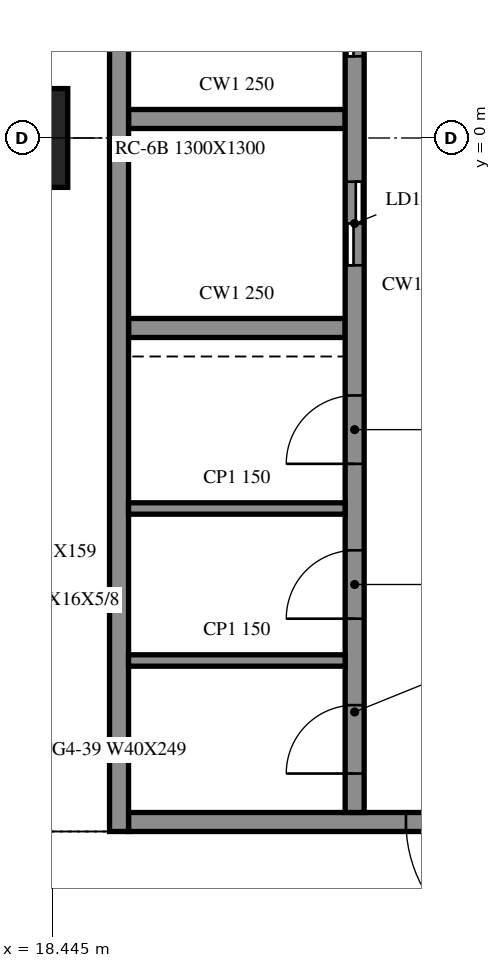
"""IFC4 building model, lengths in metres.
Left out: names, types, materials, properties, quantities, classifications, styles, units other than length and angle.
Written with IfcOpenShell. Run it as: python <this file> out.ifc"""

import sys

from ifc_helpers import new_model, si_unit, direction, frame, frame_2d, origin, origin_2d, place, context, subcontext, project, spatial, rectangle, extrude, element, fill, save


model = new_model("IFC4")
c1 = context("Model", 3, precision=1e-05, world=origin(), true_north=direction((0.0, 1.0)))
c2 = subcontext(c1, "Body", "Model", "MODEL_VIEW")
j1 = project(units=[si_unit("LENGTHUNIT", "METRE"), si_unit("PLANEANGLEUNIT", "RADIAN")], contexts=[c1])
p1 = place(None, origin())
s1 = spatial("IfcSite", under=j1, at=p1, CompositionType="ELEMENT")
p2 = place(p1, origin())
s2 = spatial("IfcBuilding", under=s1, at=p2, CompositionType="ELEMENT")
p3 = place(p2, frame((0.0, 0.0, 154.8)))
s3 = spatial("IfcBuildingStorey", under=s2, at=p3, CompositionType="ELEMENT", Elevation=154.8)
p4 = place(p3, frame((18.0, 0.0, -0.55), z_axis=(0.0, 0.0, 1.0), x_axis=(1.0, 0.0, 0.0)))
e1 = element("IfcColumn", 1, at=p4, inside=s3, PredefinedType="COLUMN", context=c2, shape_type="SweptSolid", body=[
    extrude(rectangle(XDim=1.3, YDim=1.3, at=origin_2d()), origin(), (0.0, 0.0, 1.0), 4.61),
])
p5 = place(p3, frame((19.325, 15.125, 0.0), z_axis=(0.0, 0.0, 1.0), x_axis=(0.0, -1.0, 0.0)))
e2 = element("IfcWall", 2, at=p5, inside=s3, PredefinedType="SOLIDWALL", context=c2, shape_type="SweptSolid", body=[
    extrude(rectangle(XDim=24.25, YDim=0.25, at=frame_2d((12.125, 0.0))), origin(), (0.0, 0.0, 1.0), 4.06),
])
p6 = place(p3, frame((28.55, -9.0, 0.0), z_axis=(0.0, 0.0, 1.0), x_axis=(-1.0, 0.0, 0.0)))
e3 = element("IfcWall", 3, at=p6, inside=s3, PredefinedType="SOLIDWALL", context=c2, shape_type="SweptSolid", body=[
    extrude(rectangle(XDim=9.1, YDim=0.25, at=frame_2d((4.55, 0.0))), origin(), (0.0, 0.0, 1.0), 4.06),
])
p7 = place(p6, frame((3.65, 0.0, 0.0)))
e4 = element("IfcOpeningElement", 4, at=p7, cuts=e3, PredefinedType="OPENING", context=c2, shape_type="SweptSolid", body=[
    extrude(rectangle(XDim=1.8, YDim=2.1, at=frame_2d((0.9, 1.05))), frame((0.0, 0.135, 0.0), z_axis=(0.0, -1.0, 0.0), x_axis=(1.0, 0.0, 0.0)), (0.0, 0.0, 1.0), 0.27),
])
p8 = place(p3, frame((22.425, -8.875, 0.0), z_axis=(0.0, 0.0, 1.0), x_axis=(0.0, 1.0, 0.0)))
e5 = element("IfcWall", 5, at=p8, inside=s3, PredefinedType="SOLIDWALL", context=c2, shape_type="SweptSolid", body=[
    extrude(rectangle(XDim=17.5, YDim=0.25, at=frame_2d((8.75, 0.0))), origin(), (0.0, 0.0, 1.0), 4.06),
])
p9 = place(p8, frame((7.2, 0.0, 0.0)))
e6 = element("IfcOpeningElement", 6, at=p9, cuts=e5, PredefinedType="OPENING", context=c2, shape_type="SweptSolid", body=[
    extrude(rectangle(XDim=1.1, YDim=2.1, at=frame_2d((0.55, 1.05))), frame((0.0, 0.135, 0.0), z_axis=(0.0, -1.0, 0.0), x_axis=(1.0, 0.0, 0.0)), (0.0, 0.0, 1.0), 0.27),
])
p10 = place(p8, frame((9.95, 0.0, 0.0)))
e7 = element("IfcOpeningElement", 7, at=p10, cuts=e5, PredefinedType="OPENING", context=c2, shape_type="SweptSolid", body=[
    extrude(rectangle(XDim=1.1, YDim=2.1, at=frame_2d((0.55, 1.05))), frame((0.0, 0.135, 0.0), z_axis=(0.0, -1.0, 0.0), x_axis=(1.0, 0.0, 0.0)), (0.0, 0.0, 1.0), 0.27),
])
p11 = place(p8, frame((12.7, 0.0, 0.0)))
e8 = element("IfcOpeningElement", 8, at=p11, cuts=e5, PredefinedType="OPENING", context=c2, shape_type="SweptSolid", body=[
    extrude(rectangle(XDim=1.1, YDim=2.1, at=frame_2d((0.55, 1.05))), frame((0.0, 0.135, 0.0), z_axis=(0.0, -1.0, 0.0), x_axis=(1.0, 0.0, 0.0)), (0.0, 0.0, 1.0), 0.27),
])
p12 = place(p8, frame((15.45, 0.0, 0.0)))
e9 = element("IfcOpeningElement", 9, at=p12, cuts=e5, PredefinedType="OPENING", context=c2, shape_type="SweptSolid", body=[
    extrude(rectangle(XDim=1.1, YDim=2.1, at=frame_2d((0.55, 1.05))), frame((0.0, 0.135, 0.0), z_axis=(0.0, -1.0, 0.0), x_axis=(1.0, 0.0, 0.0)), (0.0, 0.0, 1.0), 0.27),
])
p13 = place(p8, frame((0.512, 0.0, 0.0)))
e10 = element("IfcOpeningElement", 10, at=p13, cuts=e5, PredefinedType="OPENING", context=c2, shape_type="SweptSolid", body=[
    extrude(rectangle(XDim=0.9, YDim=2.1, at=frame_2d((0.45, 1.05))), frame((0.0, 0.135, 0.0), z_axis=(0.0, -1.0, 0.0), x_axis=(1.0, 0.0, 0.0)), (0.0, 0.0, 1.0), 0.27),
])
p14 = place(p8, frame((2.55, 0.0, 0.0)))
e11 = element("IfcOpeningElement", 11, at=p14, cuts=e5, PredefinedType="OPENING", context=c2, shape_type="SweptSolid", body=[
    extrude(rectangle(XDim=0.9, YDim=2.1, at=frame_2d((0.45, 1.05))), frame((0.0, 0.135, 0.0), z_axis=(0.0, -1.0, 0.0), x_axis=(1.0, 0.0, 0.0)), (0.0, 0.0, 1.0), 0.27),
])
p15 = place(p8, frame((4.587, 0.0, 0.0)))
e12 = element("IfcOpeningElement", 12, at=p15, cuts=e5, PredefinedType="OPENING", context=c2, shape_type="SweptSolid", body=[
    extrude(rectangle(XDim=0.9, YDim=2.1, at=frame_2d((0.45, 1.05))), frame((0.0, 0.135, 0.0), z_axis=(0.0, -1.0, 0.0), x_axis=(1.0, 0.0, 0.0)), (0.0, 0.0, 1.0), 0.27),
])
for number, where, z_axis, x_axis in (
    (13, (19.45, -2.5, 0.0), (0.0, 0.0, 1.0), (1.0, 0.0, 0.0)),
    (14, (19.45, 0.25, 0.0), (0.0, 0.0, 1.0), (1.0, 0.0, 0.0)),
):
    element("IfcWall", number, at=place(p3, frame(where, z_axis=z_axis, x_axis=x_axis)), inside=s3, PredefinedType="SOLIDWALL", context=c2, shape_type="SweptSolid", body=[
        extrude(rectangle(XDim=2.85, YDim=0.25, at=frame_2d((1.425, 0.0))), origin(), (0.0, 0.0, 1.0), 4.06),
    ])
for number, where, z_axis, x_axis in (
    (15, (19.45, -6.875, 0.0), (0.0, 0.0, 1.0), (1.0, 0.0, 0.0)),
    (16, (19.45, -4.875, 0.0), (0.0, 0.0, 1.0), (1.0, 0.0, 0.0)),
):
    element("IfcWall", number, at=place(p3, frame(where, z_axis=z_axis, x_axis=x_axis)), inside=s3, PredefinedType="PARTITIONING", context=c2, shape_type="SweptSolid", body=[
        extrude(rectangle(XDim=2.85, YDim=0.15, at=frame_2d((1.425, 0.0))), origin(), (0.0, 0.0, 1.0), 4.06),
    ])
p16 = place(p7, origin())
e17 = element("IfcDoor", 17, at=p16, inside=s3, OperationType="DOUBLE_DOOR_SINGLE_SWING", PredefinedType="DOOR", context=c2, shape_type="SweptSolid", body=[
    extrude(rectangle(XDim=1.8, YDim=2.1, at=frame_2d((0.9, 1.05))), frame((0.0, 0.025, 0.0), z_axis=(0.0, -1.0, 0.0), x_axis=(1.0, 0.0, 0.0)), (0.0, 0.0, 1.0), 0.05),
])
fill(e4, e17)
p17 = place(p9, origin())
e18 = element("IfcDoor", 18, at=p17, inside=s3, OperationType="DOUBLE_DOOR_SLIDING", PredefinedType="DOOR", context=c2, shape_type="SweptSolid", body=[
    extrude(rectangle(XDim=1.1, YDim=2.1, at=frame_2d((0.55, 1.05))), frame((0.0, 0.025, 0.0), z_axis=(0.0, -1.0, 0.0), x_axis=(1.0, 0.0, 0.0)), (0.0, 0.0, 1.0), 0.05),
])
fill(e6, e18)
p18 = place(p10, origin())
e19 = element("IfcDoor", 19, at=p18, inside=s3, OperationType="DOUBLE_DOOR_SLIDING", PredefinedType="DOOR", context=c2, shape_type="SweptSolid", body=[
    extrude(rectangle(XDim=1.1, YDim=2.1, at=frame_2d((0.55, 1.05))), frame((0.0, 0.025, 0.0), z_axis=(0.0, -1.0, 0.0), x_axis=(1.0, 0.0, 0.0)), (0.0, 0.0, 1.0), 0.05),
])
fill(e7, e19)
p19 = place(p13, origin())
e20 = element("IfcDoor", 20, at=p19, inside=s3, OperationType="SINGLE_SWING_RIGHT", PredefinedType="DOOR", context=c2, shape_type="SweptSolid", body=[
    extrude(rectangle(XDim=0.9, YDim=2.1, at=frame_2d((0.45, 1.05))), frame((0.0, 0.025, 0.0), z_axis=(0.0, -1.0, 0.0), x_axis=(1.0, 0.0, 0.0)), (0.0, 0.0, 1.0), 0.05),
])
fill(e10, e20)
p20 = place(p14, origin())
e21 = element("IfcDoor", 21, at=p20, inside=s3, OperationType="SINGLE_SWING_LEFT", PredefinedType="DOOR", context=c2, shape_type="SweptSolid", body=[
    extrude(rectangle(XDim=0.9, YDim=2.1, at=frame_2d((0.45, 1.05))), frame((0.0, 0.025, 0.0), z_axis=(0.0, -1.0, 0.0), x_axis=(1.0, 0.0, 0.0)), (0.0, 0.0, 1.0), 0.05),
])
fill(e11, e21)
p21 = place(p15, origin())
e22 = element("IfcDoor", 22, at=p21, inside=s3, OperationType="SINGLE_SWING_RIGHT", PredefinedType="DOOR", context=c2, shape_type="SweptSolid", body=[
    extrude(rectangle(XDim=0.9, YDim=2.1, at=frame_2d((0.45, 1.05))), frame((0.0, 0.025, 0.0), z_axis=(0.0, -1.0, 0.0), x_axis=(1.0, 0.0, 0.0)), (0.0, 0.0, 1.0), 0.05),
])
fill(e12, e22)
save(model, sys.argv[1])
